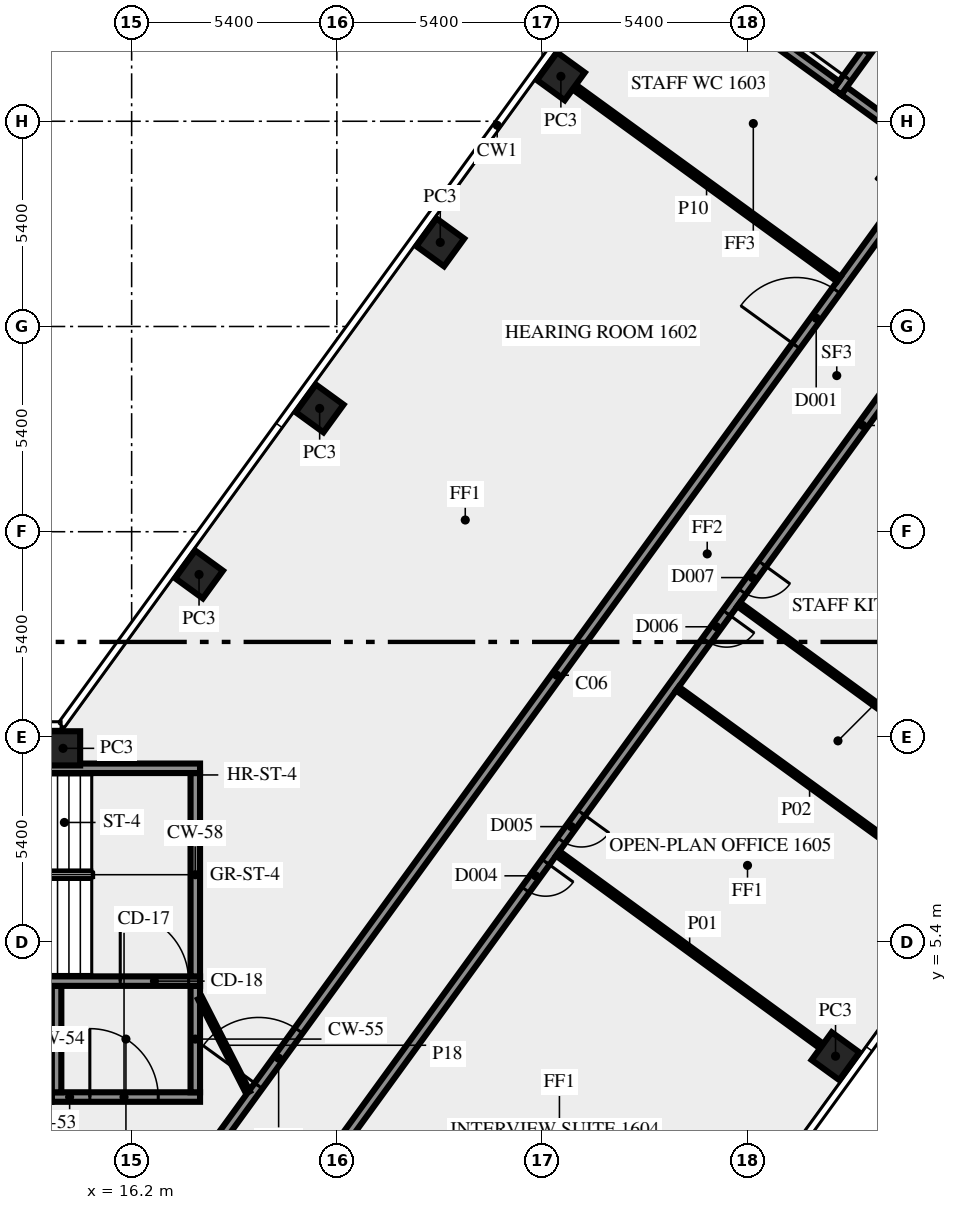
"""IFC4 building model, lengths in metres.
Left out: names, types, materials, properties, quantities, classifications, styles, units other than length and angle.
Written with IfcOpenShell. Run it as: python <this file> out.ifc"""

import sys

from ifc_helpers import new_model, si_unit, direction, frame, frame_2d, origin, origin_2d, place, context, subcontext, project, spatial, rectangle, extrude, element, fill, save


model = new_model("IFC4")
c1 = context("Model", 3, precision=1e-05, world=origin(), true_north=direction((0.0, 1.0)))
c2 = subcontext(c1, "Body", "Model", "MODEL_VIEW")
j1 = project(units=[si_unit("LENGTHUNIT", "METRE"), si_unit("PLANEANGLEUNIT", "RADIAN")], contexts=[c1])
p1 = place(None, origin())
s1 = spatial("IfcSite", under=j1, at=p1, CompositionType="ELEMENT")
p2 = place(p1, origin())
s2 = spatial("IfcBuilding", under=s1, at=p2, CompositionType="ELEMENT")
p3 = place(p2, frame((0.0, 0.0, 71.0)))
s3 = spatial("IfcBuildingStorey", under=s2, at=p3, CompositionType="ELEMENT", Elevation=71.0)
for number, where, z_axis, x_axis in (
    (1, (34.722, 2.4, 0.0), (0.0, 0.0, 1.0), (0.588, 0.809, 0.0)),
    (2, (27.495, 28.181, 0.0), (0.0, 0.0, 1.0), (-0.588, -0.809, 0.0)),
    (3, (24.321, 23.812, 0.0), (0.0, 0.0, 1.0), (-0.588, -0.809, 0.0)),
    (4, (21.147, 19.444, 0.0), (0.0, 0.0, 1.0), (-0.588, -0.809, 0.0)),
    (5, (17.974, 15.075, 0.0), (0.0, 0.0, 1.0), (-0.588, -0.809, 0.0)),
    (6, (14.395, 10.5, 0.0), (0.0, 0.0, 1.0), (-1.0, 0.0, 0.0)),
):
    element("IfcColumn", number, at=place(p3, frame(where, z_axis=z_axis, x_axis=x_axis)), inside=s3, PredefinedType="COLUMN", context=c2, shape_type="SweptSolid", body=[
        extrude(rectangle(XDim=0.9, YDim=0.9, at=origin_2d()), origin(), (0.0, 0.0, 1.0), 3.65),
    ])
p4 = place(p3, frame((14.1, 1.325, 0.0), z_axis=(0.0, 0.0, 1.0), x_axis=(1.0, 0.0, 0.0)))
e7 = element("IfcWall", 7, at=p4, inside=s3, PredefinedType="SHEAR", context=c2, shape_type="SweptSolid", body=[
    extrude(rectangle(XDim=3.9, YDim=0.25, at=frame_2d((1.95, 0.0))), origin(), (0.0, 0.0, 1.0), 3.65),
])
p5 = place(p4, frame((1.0, 0.0, 0.0)))
e8 = element("IfcOpeningElement", 8, at=p5, cuts=e7, PredefinedType="OPENING", context=c2, shape_type="SweptSolid", body=[
    extrude(rectangle(XDim=1.8, YDim=2.1, at=frame_2d((0.9, 1.05))), frame((0.0, 0.135, 0.0), z_axis=(0.0, -1.0, 0.0), x_axis=(1.0, 0.0, 0.0)), (0.0, 0.0, 1.0), 0.27),
])
for number, where, z_axis, x_axis in (
    (9, (14.225, 1.45, 0.0), (0.0, 0.0, 1.0), (0.0, 1.0, 0.0)),
    (10, (17.875, 1.45, 0.0), (0.0, 0.0, 1.0), (0.0, 1.0, 0.0)),
):
    element("IfcWall", number, at=place(p3, frame(where, z_axis=z_axis, x_axis=x_axis)), inside=s3, PredefinedType="SHEAR", context=c2, shape_type="SweptSolid", body=[
        extrude(rectangle(XDim=2.8, YDim=0.25, at=frame_2d((1.4, 0.0))), origin(), (0.0, 0.0, 1.0), 3.65),
    ])
p6 = place(p3, frame((7.5, 4.375, 0.0), z_axis=(0.0, 0.0, 1.0), x_axis=(1.0, 0.0, 0.0)))
e11 = element("IfcWall", 11, at=p6, inside=s3, PredefinedType="SHEAR", context=c2, shape_type="SweptSolid", body=[
    extrude(rectangle(XDim=10.5, YDim=0.25, at=frame_2d((5.25, 0.0))), origin(), (0.0, 0.0, 1.0), 3.65),
])
p7 = place(p6, frame((8.4, 0.0, 0.0)))
e12 = element("IfcOpeningElement", 12, at=p7, cuts=e11, PredefinedType="OPENING", context=c2, shape_type="SweptSolid", body=[
    extrude(rectangle(XDim=1.8, YDim=2.1, at=frame_2d((0.9, 1.05))), frame((0.0, 0.135, 0.0), z_axis=(0.0, -1.0, 0.0), x_axis=(1.0, 0.0, 0.0)), (0.0, 0.0, 1.0), 0.27),
])
p8 = place(p3, frame((17.875, 4.5, 0.0), z_axis=(0.0, 0.0, 1.0), x_axis=(0.0, 1.0, 0.0)))
e13 = element("IfcWall", 13, at=p8, inside=s3, PredefinedType="SHEAR", context=c2, shape_type="SweptSolid", body=[
    extrude(rectangle(XDim=5.35, YDim=0.25, at=frame_2d((2.675, 0.0))), origin(), (0.0, 0.0, 1.0), 3.65),
])
p9 = place(p3, frame((7.5, 9.975, 0.0), z_axis=(0.0, 0.0, 1.0), x_axis=(1.0, 0.0, 0.0)))
e14 = element("IfcWall", 14, at=p9, inside=s3, PredefinedType="SHEAR", context=c2, shape_type="SweptSolid", body=[
    extrude(rectangle(XDim=10.5, YDim=0.25, at=frame_2d((5.25, 0.0))), origin(), (0.0, 0.0, 1.0), 3.65),
])
p10 = place(p9, frame((2.0, 0.0, 1.0)))
e15 = element("IfcOpeningElement", 15, at=p10, cuts=e14, PredefinedType="OPENING", context=c2, shape_type="SweptSolid", body=[
    extrude(rectangle(XDim=1.2, YDim=1.2, at=frame_2d((0.6, 0.6))), frame((0.0, 0.135, 0.0), z_axis=(0.0, -1.0, 0.0), x_axis=(1.0, 0.0, 0.0)), (0.0, 0.0, 1.0), 0.27),
])
p11 = place(p3, frame((37.21, 26.154, 0.0), z_axis=(0.0, 0.0, 1.0), x_axis=(-0.809041377956, 0.587751689708, 0.0)))
e16 = element("IfcWall", 16, at=p11, inside=s3, PredefinedType="SHEAR", context=c2, shape_type="SweptSolid", body=[
    extrude(rectangle(XDim=2.8, YDim=0.25, at=frame_2d((1.4, 0.0))), origin(), (0.0, 0.0, 1.0), 3.65),
])
p12 = place(p3, frame((34.77, 27.772, 0.0), z_axis=(0.0, 0.0, 1.0), x_axis=(0.587795589702, 0.809009483706, 0.0)))
e17 = element("IfcWall", 17, at=p12, inside=s3, PredefinedType="SHEAR", context=c2, shape_type="SweptSolid", body=[
    extrude(rectangle(XDim=10.5, YDim=0.25, at=frame_2d((5.25, 0.0))), origin(), (0.0, 0.0, 1.0), 3.65),
])
p13 = place(p12, frame((0.45, 0.0, 0.0)))
e18 = element("IfcOpeningElement", 18, at=p13, cuts=e17, PredefinedType="OPENING", context=c2, shape_type="SweptSolid", body=[
    extrude(rectangle(XDim=1.8, YDim=2.1, at=frame_2d((0.9, 1.05))), frame((0.0, 0.135, 0.0), z_axis=(0.0, -1.0, 0.0), x_axis=(1.0, 0.0, 0.0)), (0.0, 0.0, 1.0), 0.27),
])
p14 = place(p3, frame((34.742, 27.947, 0.0), z_axis=(0.0, 0.0, 1.0), x_axis=(-0.8089984606, 0.587810760999, 0.0)))
e19 = element("IfcWall", 19, at=p14, inside=s3, PredefinedType="SHEAR", context=c2, shape_type="SweptSolid", body=[
    extrude(rectangle(XDim=5.35, YDim=0.25, at=frame_2d((2.675, 0.0))), origin(), (0.0, 0.0, 1.0), 3.65),
])
p15 = place(p3, frame((17.545, -1.125, 0.0), z_axis=(0.0, 0.0, 1.0), x_axis=(0.587786323093, 0.809016216391, 0.0)))
e20 = element("IfcWall", 20, at=p15, inside=s3, PredefinedType="SOLIDWALL", context=c2, shape_type="SweptSolid", body=[
    extrude(rectangle(XDim=33.493, YDim=0.25, at=frame_2d((16.747, 0.0))), origin(), (0.0, 0.0, 1.0), 3.65),
])
p16 = place(p15, frame((27.458, 0.0, 0.0)))
e21 = element("IfcOpeningElement", 21, at=p16, cuts=e20, PredefinedType="OPENING", context=c2, shape_type="SweptSolid", body=[
    extrude(rectangle(XDim=1.8, YDim=2.1, at=frame_2d((0.9, 1.05))), frame((0.0, 0.135, 0.0), z_axis=(0.0, -1.0, 0.0), x_axis=(1.0, 0.0, 0.0)), (0.0, 0.0, 1.0), 0.27),
])
p17 = place(p15, frame((3.392, 0.0, 0.0)))
e22 = element("IfcOpeningElement", 22, at=p17, cuts=e20, PredefinedType="OPENING", context=c2, shape_type="SweptSolid", body=[
    extrude(rectangle(XDim=1.8, YDim=2.1, at=frame_2d((0.9, 1.05))), frame((0.0, 0.135, 0.0), z_axis=(0.0, -1.0, 0.0), x_axis=(1.0, 0.0, 0.0)), (0.0, 0.0, 1.0), 0.27),
])
p18 = place(p15, frame((32.253, 0.0, 0.0)))
e23 = element("IfcOpeningElement", 23, at=p18, cuts=e20, PredefinedType="OPENING", context=c2, shape_type="SweptSolid", body=[
    extrude(rectangle(XDim=0.9, YDim=2.1, at=frame_2d((0.45, 1.05))), frame((0.0, 0.135, 0.0), z_axis=(0.0, -1.0, 0.0), x_axis=(1.0, 0.0, 0.0)), (0.0, 0.0, 1.0), 0.27),
])
p19 = place(p3, frame((43.467, 30.045, 0.0), z_axis=(0.0, 0.0, 1.0), x_axis=(-0.587784726077, -0.809017376692, 0.0)))
e24 = element("IfcWall", 24, at=p19, inside=s3, PredefinedType="SOLIDWALL", context=c2, shape_type="SweptSolid", body=[
    extrude(rectangle(XDim=39.02, YDim=0.25, at=frame_2d((19.51, 0.0))), origin(), (0.0, 0.0, 1.0), 3.65),
])
p20 = place(p19, frame((26.254, 0.0, 0.0)))
e25 = element("IfcOpeningElement", 25, at=p20, cuts=e24, PredefinedType="OPENING", context=c2, shape_type="SweptSolid", body=[
    extrude(rectangle(XDim=0.9, YDim=2.1, at=frame_2d((0.45, 1.05))), frame((0.0, 0.135, 0.0), z_axis=(0.0, -1.0, 0.0), x_axis=(1.0, 0.0, 0.0)), (0.0, 0.0, 1.0), 0.27),
])
p21 = place(p19, frame((2.205, 0.0, 0.0)))
e26 = element("IfcOpeningElement", 26, at=p21, cuts=e24, PredefinedType="OPENING", context=c2, shape_type="SweptSolid", body=[
    extrude(rectangle(XDim=0.9, YDim=2.1, at=frame_2d((0.45, 1.05))), frame((0.0, 0.135, 0.0), z_axis=(0.0, -1.0, 0.0), x_axis=(1.0, 0.0, 0.0)), (0.0, 0.0, 1.0), 0.27),
])
p22 = place(p19, frame((27.855, 0.0, 0.0)))
e27 = element("IfcOpeningElement", 27, at=p22, cuts=e24, PredefinedType="OPENING", context=c2, shape_type="SweptSolid", body=[
    extrude(rectangle(XDim=0.9, YDim=2.1, at=frame_2d((0.45, 1.05))), frame((0.0, 0.135, 0.0), z_axis=(0.0, -1.0, 0.0), x_axis=(1.0, 0.0, 0.0)), (0.0, 0.0, 1.0), 0.27),
])
p23 = place(p19, frame((18.155, 0.0, 0.0)))
e28 = element("IfcOpeningElement", 28, at=p23, cuts=e24, PredefinedType="OPENING", context=c2, shape_type="SweptSolid", body=[
    extrude(rectangle(XDim=0.9, YDim=2.1, at=frame_2d((0.45, 1.05))), frame((0.0, 0.135, 0.0), z_axis=(0.0, -1.0, 0.0), x_axis=(1.0, 0.0, 0.0)), (0.0, 0.0, 1.0), 0.27),
])
p24 = place(p19, frame((19.755, 0.0, 0.0)))
e29 = element("IfcOpeningElement", 29, at=p24, cuts=e24, PredefinedType="OPENING", context=c2, shape_type="SweptSolid", body=[
    extrude(rectangle(XDim=0.9, YDim=2.1, at=frame_2d((0.45, 1.05))), frame((0.0, 0.135, 0.0), z_axis=(0.0, -1.0, 0.0), x_axis=(1.0, 0.0, 0.0)), (0.0, 0.0, 1.0), 0.27),
])
p25 = place(p19, frame((0.224, 0.0, 0.0)))
e30 = element("IfcOpeningElement", 30, at=p25, cuts=e24, PredefinedType="OPENING", context=c2, shape_type="SweptSolid", body=[
    extrude(rectangle(XDim=0.9, YDim=2.1, at=frame_2d((0.45, 1.05))), frame((0.0, 0.135, 0.0), z_axis=(0.0, -1.0, 0.0), x_axis=(1.0, 0.0, 0.0)), (0.0, 0.0, 1.0), 0.27),
])
p26 = place(p3, frame((27.413, 7.735, 0.0), z_axis=(0.0, 0.0, 1.0), x_axis=(0.807664804385, -0.589641894507, 0.0)))
e31 = element("IfcWall", 31, at=p26, inside=s3, PredefinedType="PARTITIONING", context=c2, shape_type="SweptSolid", body=[
    extrude(rectangle(XDim=8.594, YDim=0.15, at=frame_2d((4.297, 0.0))), origin(), (0.0, 0.0, 1.0), 3.65),
])
p27 = place(p3, frame((37.516, 7.02, 0.0), z_axis=(0.0, 0.0, 1.0), x_axis=(-0.809002556908, 0.587805123248, 0.0)))
e32 = element("IfcWall", 32, at=p27, inside=s3, PredefinedType="PARTITIONING", context=c2, shape_type="SweptSolid", body=[
    extrude(rectangle(XDim=8.595, YDim=0.12, at=frame_2d((4.297, 0.0))), origin(), (0.0, 0.0, 1.0), 3.65),
])
p28 = place(p3, frame((34.806, 22.845, 0.0), z_axis=(0.0, 0.0, 1.0), x_axis=(-0.809030728677, 0.587766348183, 0.0)))
e33 = element("IfcWall", 33, at=p28, inside=s3, PredefinedType="PARTITIONING", context=c2, shape_type="SweptSolid", body=[
    extrude(rectangle(XDim=8.596, YDim=0.15, at=frame_2d((4.298, 0.0))), origin(), (0.0, 0.0, 1.0), 3.65),
])
p29 = place(p3, frame((32.174, 14.288, 0.0), z_axis=(0.0, 0.0, 1.0), x_axis=(0.807664588563, -0.589642190131, 0.0)))
e34 = element("IfcWall", 34, at=p29, inside=s3, PredefinedType="PARTITIONING", context=c2, shape_type="SweptSolid", body=[
    extrude(rectangle(XDim=9.55, YDim=0.12, at=frame_2d((4.775, 0.0))), origin(), (0.0, 0.0, 1.0), 2.75),
])
p30 = place(p3, frame((18.0, 3.925, 0.0), z_axis=(0.0, 0.0, 1.0), x_axis=(0.453950796792, -0.891026752736, 0.0)))
e35 = element("IfcWall", 35, at=p30, inside=s3, PredefinedType="PARTITIONING", context=c2, shape_type="SweptSolid", body=[
    extrude(rectangle(XDim=2.778, YDim=0.12, at=frame_2d((1.389, 0.0))), origin(), (0.0, 0.0, 1.0), 3.65),
])
p31 = place(p5, origin())
e36 = element("IfcDoor", 36, at=p31, inside=s3, OperationType="DOUBLE_DOOR_SINGLE_SWING", PredefinedType="DOOR", context=c2, shape_type="SweptSolid", body=[
    extrude(rectangle(XDim=1.8, YDim=2.1, at=frame_2d((0.9, 1.05))), frame((0.0, 0.025, 0.0), z_axis=(0.0, -1.0, 0.0), x_axis=(1.0, 0.0, 0.0)), (0.0, 0.0, 1.0), 0.05),
])
fill(e8, e36)
p32 = place(p7, origin())
e37 = element("IfcDoor", 37, at=p32, inside=s3, OperationType="DOUBLE_DOOR_SINGLE_SWING", PredefinedType="DOOR", context=c2, shape_type="SweptSolid", body=[
    extrude(rectangle(XDim=1.8, YDim=2.1, at=frame_2d((0.9, 1.05))), frame((0.0, 0.025, 0.0), z_axis=(0.0, -1.0, 0.0), x_axis=(1.0, 0.0, 0.0)), (0.0, 0.0, 1.0), 0.05),
])
fill(e12, e37)
p33 = place(p13, origin())
e38 = element("IfcDoor", 38, at=p33, inside=s3, OperationType="DOUBLE_DOOR_SINGLE_SWING", PredefinedType="DOOR", context=c2, shape_type="SweptSolid", body=[
    extrude(rectangle(XDim=1.8, YDim=2.1, at=frame_2d((0.9, 1.05))), frame((0.0, 0.025, 0.0), z_axis=(0.0, -1.0, 0.0), x_axis=(1.0, 0.0, 0.0)), (0.0, 0.0, 1.0), 0.05),
])
fill(e18, e38)
p34 = place(p20, origin())
e39 = element("IfcDoor", 39, at=p34, inside=s3, OperationType="SINGLE_SWING_RIGHT", PredefinedType="DOOR", context=c2, shape_type="SweptSolid", body=[
    extrude(rectangle(XDim=0.9, YDim=2.1, at=frame_2d((0.45, 1.05))), frame((0.0, 0.025, 0.0), z_axis=(0.0, -1.0, 0.0), x_axis=(1.0, 0.0, 0.0)), (0.0, 0.0, 1.0), 0.05),
])
fill(e25, e39)
p35 = place(p16, origin())
e40 = element("IfcDoor", 40, at=p35, inside=s3, OperationType="DOUBLE_DOOR_SINGLE_SWING", PredefinedType="DOOR", context=c2, shape_type="SweptSolid", body=[
    extrude(rectangle(XDim=1.8, YDim=2.1, at=frame_2d((0.9, 1.05))), frame((0.0, 0.025, 0.0), z_axis=(0.0, -1.0, 0.0), x_axis=(1.0, 0.0, 0.0)), (0.0, 0.0, 1.0), 0.05),
])
fill(e21, e40)
p36 = place(p17, origin())
e41 = element("IfcDoor", 41, at=p36, inside=s3, OperationType="DOUBLE_DOOR_SINGLE_SWING", PredefinedType="DOOR", context=c2, shape_type="SweptSolid", body=[
    extrude(rectangle(XDim=1.8, YDim=2.1, at=frame_2d((0.9, 1.05))), frame((0.0, 0.025, 0.0), z_axis=(0.0, -1.0, 0.0), x_axis=(1.0, 0.0, 0.0)), (0.0, 0.0, 1.0), 0.05),
])
fill(e22, e41)
p37 = place(p22, origin())
e42 = element("IfcDoor", 42, at=p37, inside=s3, OperationType="SINGLE_SWING_LEFT", PredefinedType="DOOR", context=c2, shape_type="SweptSolid", body=[
    extrude(rectangle(XDim=0.9, YDim=2.1, at=frame_2d((0.45, 1.05))), frame((0.0, 0.025, 0.0), z_axis=(0.0, -1.0, 0.0), x_axis=(1.0, 0.0, 0.0)), (0.0, 0.0, 1.0), 0.05),
])
fill(e27, e42)
p38 = place(p23, origin())
e43 = element("IfcDoor", 43, at=p38, inside=s3, OperationType="SINGLE_SWING_RIGHT", PredefinedType="DOOR", context=c2, shape_type="SweptSolid", body=[
    extrude(rectangle(XDim=0.9, YDim=2.1, at=frame_2d((0.45, 1.05))), frame((0.0, 0.025, 0.0), z_axis=(0.0, -1.0, 0.0), x_axis=(1.0, 0.0, 0.0)), (0.0, 0.0, 1.0), 0.05),
])
fill(e28, e43)
p39 = place(p24, origin())
e44 = element("IfcDoor", 44, at=p39, inside=s3, OperationType="SINGLE_SWING_LEFT", PredefinedType="DOOR", context=c2, shape_type="SweptSolid", body=[
    extrude(rectangle(XDim=0.9, YDim=2.1, at=frame_2d((0.45, 1.05))), frame((0.0, 0.025, 0.0), z_axis=(0.0, -1.0, 0.0), x_axis=(1.0, 0.0, 0.0)), (0.0, 0.0, 1.0), 0.05),
])
fill(e29, e44)
save(model, sys.argv[1])
